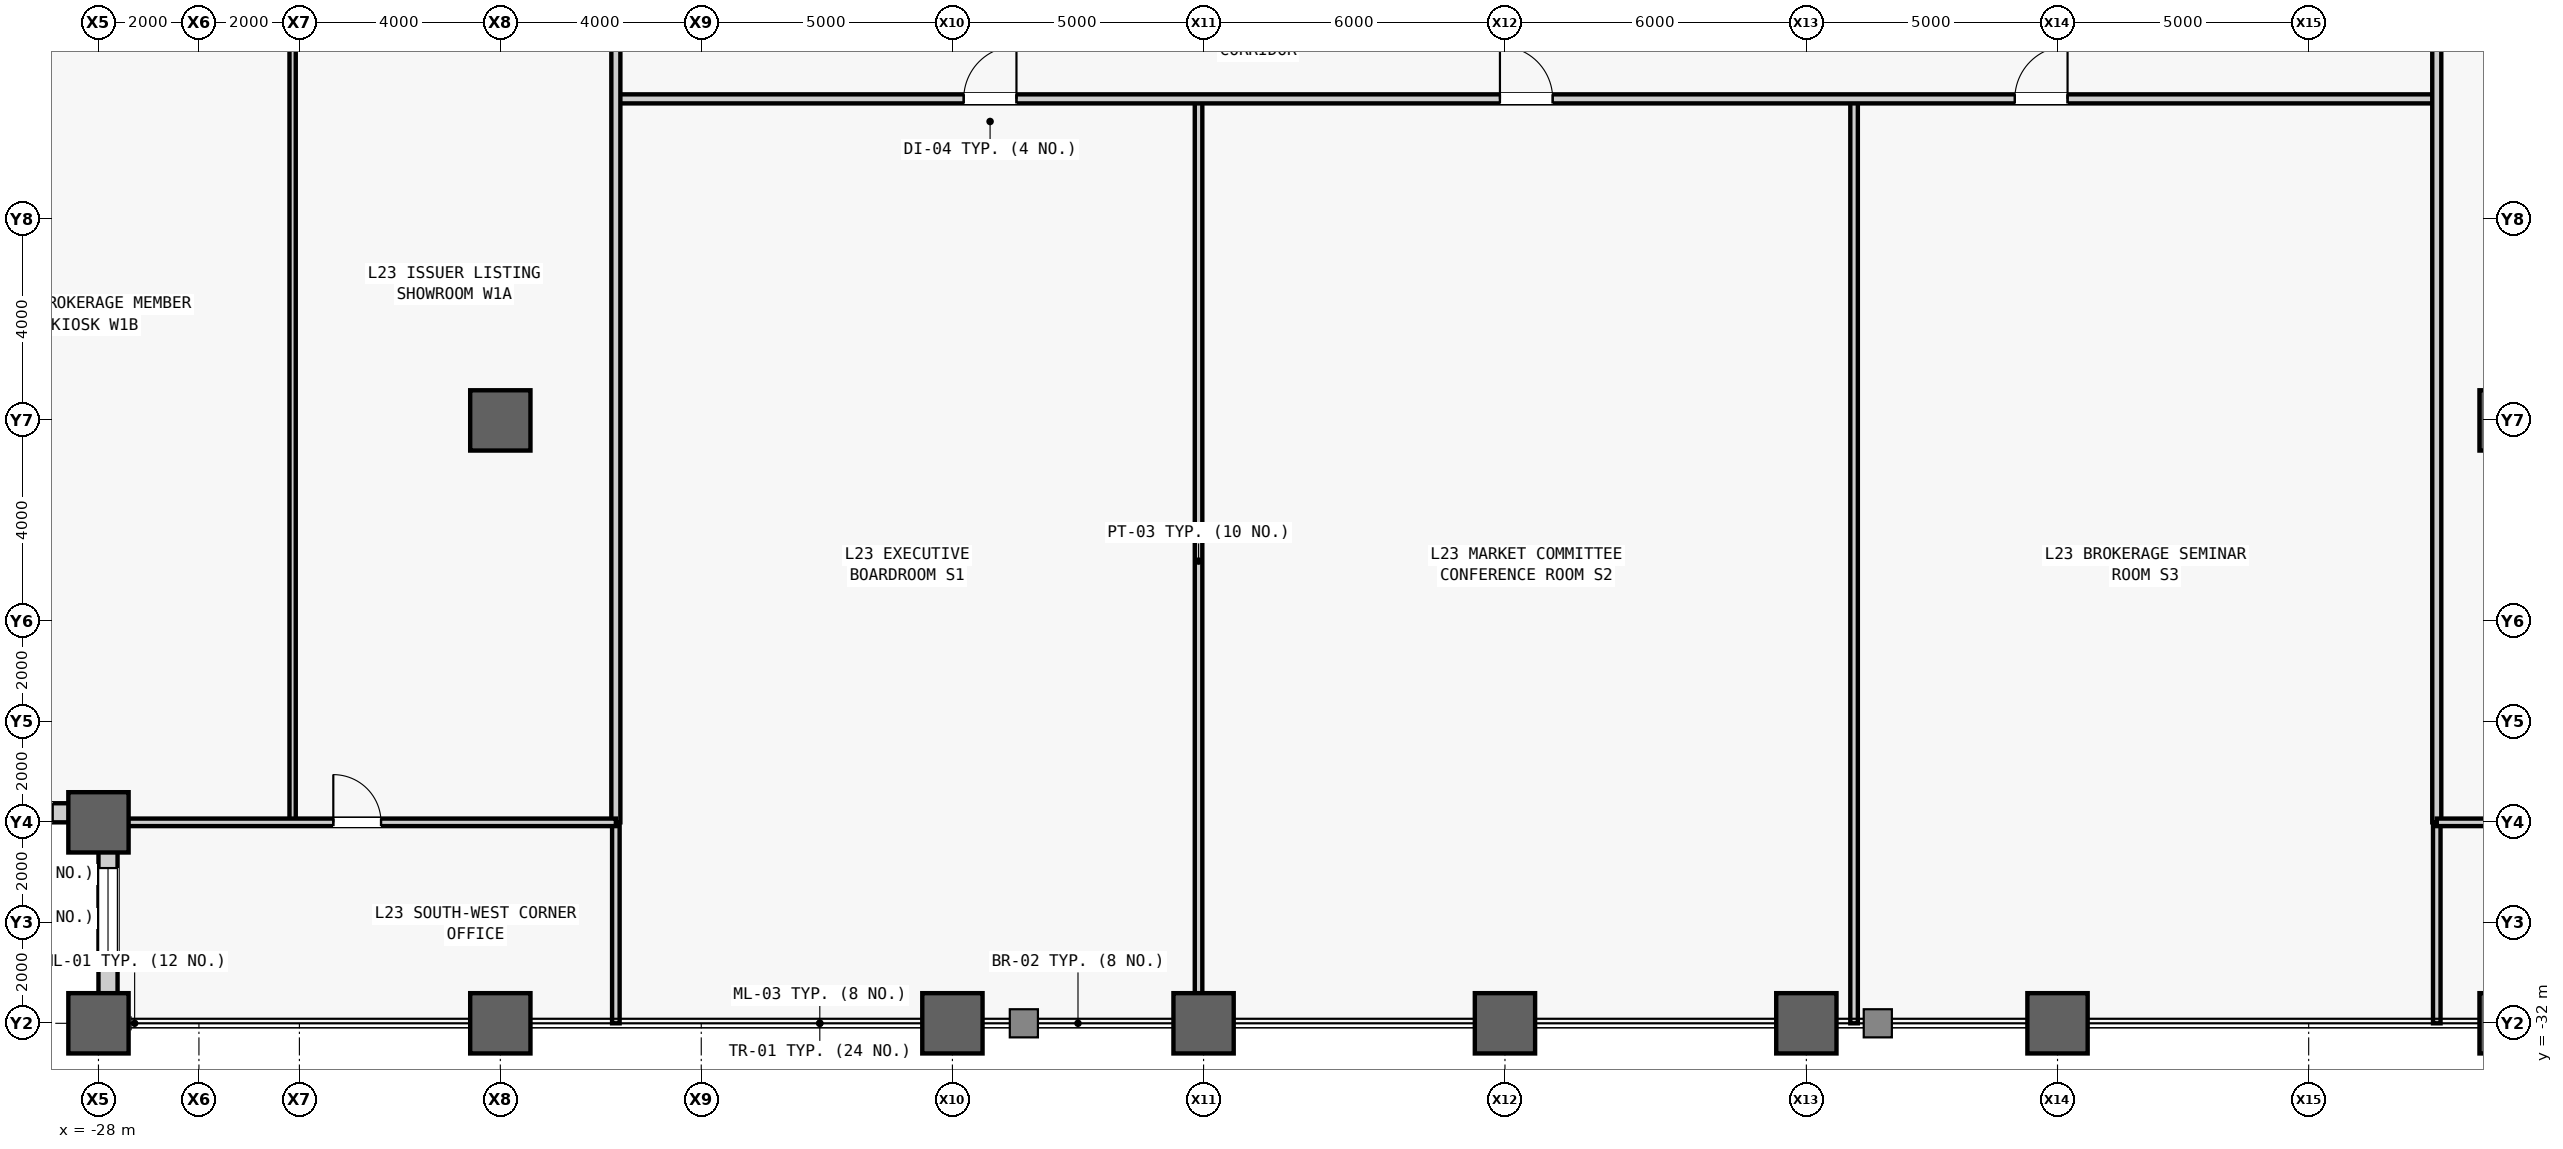
"""IFC4 building model, lengths in metres.
Left out: names, types, materials, properties, quantities, classifications, styles, units other than length and angle.
Written with IfcOpenShell. Run it as: python <this file> out.ifc"""

import sys

from ifc_helpers import new_model, si_unit, direction, frame, frame_2d, origin, origin_2d, place, context, subcontext, project, spatial, rectangle, hollow_rectangle, extrude, source, transform, mapped, element, fill, save


model = new_model("IFC4")
c1 = context("Model", 3, precision=1e-05, world=origin(), true_north=direction((0.0, 1.0)))
c2 = subcontext(c1, "Body", "Model", "MODEL_VIEW")
j1 = project(units=[si_unit("LENGTHUNIT", "METRE"), si_unit("PLANEANGLEUNIT", "RADIAN")], contexts=[c1])
p1 = place(None, origin())
s1 = spatial("IfcSite", under=j1, at=p1, CompositionType="ELEMENT")
p2 = place(p1, origin())
s2 = spatial("IfcBuilding", under=s1, at=p2, CompositionType="ELEMENT")
p3 = place(p2, frame((0.0, 0.0, 103.7)))
s3 = spatial("IfcBuildingStorey", under=s2, at=p3, CompositionType="ELEMENT", Elevation=103.7)
m1 = source(origin(), c2, "Body", "SweptSolid", [
    extrude(hollow_rectangle(XDim=1.2, YDim=1.2, WallThickness=0.07, at=origin_2d()), origin(), (0.0, 0.0, 1.0), 4.1),
])
for number, where, z_axis, x_axis in (
    (1, (-28.0, -32.0, 0.0), (0.0, 0.0, 1.0), (1.0, 0.0, 0.0)),
    (2, (-28.0, -28.0, 0.0), (0.0, 0.0, 1.0), (1.0, 0.0, 0.0)),
    (3, (-20.0, -32.0, 0.0), (0.0, 0.0, 1.0), (1.0, 0.0, 0.0)),
    (4, (-20.0, -20.0, 0.0), (0.0, 0.0, 1.0), (1.0, 0.0, 0.0)),
    (5, (-11.0, -32.0, 0.0), (0.0, 0.0, 1.0), (1.0, 0.0, 0.0)),
    (6, (-6.0, -32.0, 0.0), (0.0, 0.0, 1.0), (1.0, 0.0, 0.0)),
    (7, (0.0, -32.0, 0.0), (0.0, 0.0, 1.0), (1.0, 0.0, 0.0)),
    (8, (6.0, -32.0, 0.0), (0.0, 0.0, 1.0), (1.0, 0.0, 0.0)),
    (9, (11.0, -32.0, 0.0), (0.0, 0.0, 1.0), (1.0, 0.0, 0.0)),
    (10, (20.0, -32.0, 0.0), (0.0, 0.0, 1.0), (1.0, 0.0, 0.0)),
    (11, (20.0, -20.0, 0.0), (0.0, 0.0, 1.0), (1.0, 0.0, 0.0)),
):
    element("IfcColumn", number, at=place(p3, frame(where, z_axis=z_axis, x_axis=x_axis)), inside=s3, PredefinedType="COLUMN", context=c2, shape_type="MappedRepresentation", body=[
        mapped(m1, transform((0.0, 0.0, 0.0), scale=1.0)),
    ])
m2 = source(origin(), c2, "Body", "SweptSolid", [
    extrude(rectangle(XDim=3.62, YDim=0.38, at=frame_2d((1.81, 0.0))), origin(), (0.0, 0.0, 1.0), 3.145),
])
p4 = place(p3, frame((-28.0, -27.81, 0.0), z_axis=(0.0, 0.0, 1.0), x_axis=(-1.0, 0.0, 0.0)))
e12 = element("IfcWall", 12, at=p4, inside=s3, PredefinedType="STANDARD", context=c2, shape_type="MappedRepresentation", body=[
    mapped(m2, transform((0.0, 0.0, 0.0), scale=1.0)),
])
m3 = source(origin(), c2, "Body", "SweptSolid", [
    extrude(rectangle(XDim=1.8, YDim=2.4, at=frame_2d((0.9, 1.2))), frame((0.0, 0.2, 0.0), z_axis=(0.0, -1.0, 0.0), x_axis=(1.0, 0.0, 0.0)), (0.0, 0.0, 1.0), 0.4),
])
p5 = place(p4, frame((0.91, 0.0, 0.5)))
e13 = element("IfcOpeningElement", 13, at=p5, cuts=e12, PredefinedType="OPENING", context=c2, shape_type="MappedRepresentation", body=[
    mapped(m3, transform((0.0, 0.0, 0.0), scale=1.0)),
])
p6 = place(p3, frame((-27.81, -31.62, 0.0), z_axis=(0.0, 0.0, 1.0), x_axis=(0.0, 1.0, 0.0)))
e14 = element("IfcWall", 14, at=p6, inside=s3, PredefinedType="STANDARD", context=c2, shape_type="MappedRepresentation", body=[
    mapped(m2, transform((0.0, 0.0, 0.0), scale=1.0)),
])
p7 = place(p6, frame((0.91, 0.0, 0.5)))
e15 = element("IfcOpeningElement", 15, at=p7, cuts=e14, PredefinedType="OPENING", context=c2, shape_type="MappedRepresentation", body=[
    mapped(m3, transform((0.0, 0.0, 0.0), scale=1.0)),
])
m4 = source(origin(), c2, "Body", "SweptSolid", [
    extrude(rectangle(XDim=18.4, YDim=0.15, at=frame_2d((9.2, 0.0))), origin(), (0.0, 0.0, 1.0), 3.067),
])
p8 = place(p3, frame((-6.1, -32.0, 0.0), z_axis=(0.0, 0.0, 1.0), x_axis=(0.0, 1.0, 0.0)))
e16 = element("IfcWall", 16, at=p8, inside=s3, PredefinedType="PARTITIONING", context=c2, shape_type="MappedRepresentation", body=[
    mapped(m4, transform((0.0, 0.0, 0.0), scale=1.0)),
])
m5 = source(origin(), c2, "Body", "SweptSolid", [
    extrude(rectangle(XDim=18.4, YDim=0.15, at=frame_2d((9.2, 0.0))), origin(), (0.0, 0.0, 1.0), 3.84),
])
p9 = place(p3, frame((6.95, -32.0, 0.0), z_axis=(0.0, 0.0, 1.0), x_axis=(0.0, 1.0, 0.0)))
e17 = element("IfcWall", 17, at=p9, inside=s3, PredefinedType="PARTITIONING", context=c2, shape_type="MappedRepresentation", body=[
    mapped(m5, transform((0.0, 0.0, 0.0), scale=1.0)),
])
m6 = source(origin(), c2, "Body", "SweptSolid", [
    extrude(rectangle(XDim=36.25, YDim=0.18, at=frame_2d((18.125, 0.0))), origin(), (0.0, 0.0, 1.0), 3.84),
])
p10 = place(p3, frame((-17.7, -13.6, 0.0), z_axis=(0.0, 0.0, 1.0), x_axis=(1.0, 0.0, 0.0)))
e18 = element("IfcWall", 18, at=p10, inside=s3, PredefinedType="PARTITIONING", context=c2, shape_type="MappedRepresentation", body=[
    mapped(m6, transform((0.0, 0.0, 0.0), scale=1.0)),
])
m7 = source(origin(), c2, "Body", "SweptSolid", [
    extrude(rectangle(XDim=1.05, YDim=2.2, at=frame_2d((0.525, 1.1))), frame((0.0, 0.1, 0.0), z_axis=(0.0, -1.0, 0.0), x_axis=(1.0, 0.0, 0.0)), (0.0, 0.0, 1.0), 0.2),
])
p11 = place(p10, frame((6.925, 0.0, 0.0)))
e19 = element("IfcOpeningElement", 19, at=p11, cuts=e18, PredefinedType="OPENING", context=c2, shape_type="MappedRepresentation", body=[
    mapped(m7, transform((0.0, 0.0, 0.0), scale=1.0)),
])
p12 = place(p10, frame((17.6, 0.0, 0.0)))
e20 = element("IfcOpeningElement", 20, at=p12, cuts=e18, PredefinedType="OPENING", context=c2, shape_type="MappedRepresentation", body=[
    mapped(m7, transform((0.0, 0.0, 0.0), scale=1.0)),
])
p13 = place(p10, frame((27.85, 0.0, 0.0)))
e21 = element("IfcOpeningElement", 21, at=p13, cuts=e18, PredefinedType="OPENING", context=c2, shape_type="MappedRepresentation", body=[
    mapped(m7, transform((0.0, 0.0, 0.0), scale=1.0)),
])
m8 = source(origin(), c2, "Body", "SweptSolid", [
    extrude(rectangle(XDim=4.0, YDim=0.15, at=frame_2d((2.0, 0.0))), origin(), (0.0, 0.0, 1.0), 3.84),
])
for number, where, z_axis, x_axis in (
    (22, (-17.7, -32.0, 0.0), (0.0, 0.0, 1.0), (0.0, 1.0, 0.0)),
    (23, (18.55, -32.0, 0.0), (0.0, 0.0, 1.0), (0.0, 1.0, 0.0)),
):
    element("IfcWall", number, at=place(p3, frame(where, z_axis=z_axis, x_axis=x_axis)), inside=s3, PredefinedType="PARTITIONING", context=c2, shape_type="MappedRepresentation", body=[
        mapped(m8, transform((0.0, 0.0, 0.0), scale=1.0)),
    ])
m9 = source(origin(), c2, "Body", "SweptSolid", [
    extrude(rectangle(XDim=27.135, YDim=0.125, at=frame_2d((13.567, 0.0))), origin(), (0.0, 0.0, 1.0), 3.84),
])
p14 = place(p3, frame((-24.135, -28.0, 0.0), z_axis=(0.0, 0.0, 1.0), x_axis=(0.0, 1.0, 0.0)))
e24 = element("IfcWall", 24, at=p14, inside=s3, PredefinedType="PARTITIONING", context=c2, shape_type="MappedRepresentation", body=[
    mapped(m9, transform((0.0, 0.0, 0.0), scale=1.0)),
])
m10 = source(origin(), c2, "Body", "SweptSolid", [
    extrude(rectangle(XDim=0.95, YDim=2.15, at=frame_2d((0.475, 1.075))), frame((0.0, 0.073, 0.0), z_axis=(0.0, -1.0, 0.0), x_axis=(1.0, 0.0, 0.0)), (0.0, 0.0, 1.0), 0.145),
])
p15 = place(p14, frame((20.292, 0.0, 0.0)))
e25 = element("IfcOpeningElement", 25, at=p15, cuts=e24, PredefinedType="OPENING", context=c2, shape_type="MappedRepresentation", body=[
    mapped(m10, transform((0.0, 0.0, 0.0), scale=1.0)),
])
m11 = source(origin(), c2, "Body", "SweptSolid", [
    extrude(rectangle(XDim=56.0, YDim=0.18, at=frame_2d((28.0, 0.0))), origin(), (0.0, 0.0, 1.0), 3.84),
])
p16 = place(p3, frame((-17.7, -28.0, 0.0), z_axis=(0.0, 0.0, 1.0), x_axis=(0.0, 1.0, 0.0)))
e26 = element("IfcWall", 26, at=p16, inside=s3, PredefinedType="PARTITIONING", context=c2, shape_type="MappedRepresentation", body=[
    mapped(m11, transform((0.0, 0.0, 0.0), scale=1.0)),
])
m12 = source(origin(), c2, "Body", "SweptSolid", [
    extrude(rectangle(XDim=0.95, YDim=2.15, at=frame_2d((0.475, 1.075))), frame((0.0, 0.1, 0.0), z_axis=(0.0, -1.0, 0.0), x_axis=(1.0, 0.0, 0.0)), (0.0, 0.0, 1.0), 0.2),
])
p17 = place(p16, frame((20.593, 0.0, 0.0)))
e27 = element("IfcOpeningElement", 27, at=p17, cuts=e26, PredefinedType="OPENING", context=c2, shape_type="MappedRepresentation", body=[
    mapped(m12, transform((0.0, 0.0, 0.0), scale=1.0)),
])
p18 = place(p16, frame((34.143, 0.0, 0.0)))
e28 = element("IfcOpeningElement", 28, at=p18, cuts=e26, PredefinedType="OPENING", context=c2, shape_type="MappedRepresentation", body=[
    mapped(m12, transform((0.0, 0.0, 0.0), scale=1.0)),
])
p19 = place(p3, frame((18.55, -28.0, 0.0), z_axis=(0.0, 0.0, 1.0), x_axis=(0.0, 1.0, 0.0)))
e29 = element("IfcWall", 29, at=p19, inside=s3, PredefinedType="PARTITIONING", context=c2, shape_type="MappedRepresentation", body=[
    mapped(m11, transform((0.0, 0.0, 0.0), scale=1.0)),
])
p20 = place(p19, frame((19.036, 0.0, 0.0)))
e30 = element("IfcOpeningElement", 30, at=p20, cuts=e29, PredefinedType="OPENING", context=c2, shape_type="MappedRepresentation", body=[
    mapped(m12, transform((0.0, 0.0, 0.0), scale=1.0)),
])
p21 = place(p19, frame((28.358, 0.0, 0.0)))
e31 = element("IfcOpeningElement", 31, at=p21, cuts=e29, PredefinedType="OPENING", context=c2, shape_type="MappedRepresentation", body=[
    mapped(m12, transform((0.0, 0.0, 0.0), scale=1.0)),
])
p22 = place(p19, frame((37.397, 0.0, 0.0)))
e32 = element("IfcOpeningElement", 32, at=p22, cuts=e29, PredefinedType="OPENING", context=c2, shape_type="MappedRepresentation", body=[
    mapped(m12, transform((0.0, 0.0, 0.0), scale=1.0)),
])
m13 = source(origin(), c2, "Body", "SweptSolid", [
    extrude(rectangle(XDim=10.3, YDim=0.15, at=frame_2d((5.15, 0.0))), origin(), (0.0, 0.0, 1.0), 3.84),
])
p23 = place(p3, frame((-28.0, -28.0, 0.0), z_axis=(0.0, 0.0, 1.0), x_axis=(1.0, 0.0, 0.0)))
e33 = element("IfcWall", 33, at=p23, inside=s3, PredefinedType="PARTITIONING", context=c2, shape_type="MappedRepresentation", body=[
    mapped(m13, transform((0.0, 0.0, 0.0), scale=1.0)),
])
m14 = source(origin(), c2, "Body", "SweptSolid", [
    extrude(rectangle(XDim=0.95, YDim=2.15, at=frame_2d((0.475, 1.075))), frame((0.0, 0.085, 0.0), z_axis=(0.0, -1.0, 0.0), x_axis=(1.0, 0.0, 0.0)), (0.0, 0.0, 1.0), 0.17),
])
p24 = place(p23, frame((4.675, 0.0, 0.0)))
e34 = element("IfcOpeningElement", 34, at=p24, cuts=e33, PredefinedType="OPENING", context=c2, shape_type="MappedRepresentation", body=[
    mapped(m14, transform((0.0, 0.0, 0.0), scale=1.0)),
])
m15 = source(origin(), c2, "Body", "SweptSolid", [
    extrude(rectangle(XDim=9.45, YDim=0.15, at=frame_2d((4.725, 0.0))), origin(), (0.0, 0.0, 1.0), 3.84),
])
p25 = place(p3, frame((18.55, -28.0, 0.0), z_axis=(0.0, 0.0, 1.0), x_axis=(1.0, 0.0, 0.0)))
e35 = element("IfcWall", 35, at=p25, inside=s3, PredefinedType="PARTITIONING", context=c2, shape_type="MappedRepresentation", body=[
    mapped(m15, transform((0.0, 0.0, 0.0), scale=1.0)),
])
p26 = place(p25, frame((4.25, 0.0, 0.0)))
e36 = element("IfcOpeningElement", 36, at=p26, cuts=e35, PredefinedType="OPENING", context=c2, shape_type="MappedRepresentation", body=[
    mapped(m14, transform((0.0, 0.0, 0.0), scale=1.0)),
])
m16 = source(origin(), c2, "Body", "SweptSolid", [
    extrude(rectangle(XDim=1.8, YDim=2.4, at=frame_2d((0.9, 1.2))), frame((0.0, 0.03, 0.0), z_axis=(0.0, -1.0, 0.0), x_axis=(1.0, 0.0, 0.0)), (0.0, 0.0, 1.0), 0.06),
])
p27 = place(p5, origin())
e37 = element("IfcWindow", 37, at=p27, inside=s3, PartitioningType="SINGLE_PANEL", PredefinedType="WINDOW", context=c2, shape_type="MappedRepresentation", body=[
    mapped(m16, transform((0.0, 0.0, 0.0), scale=1.0)),
])
fill(e13, e37)
p28 = place(p7, origin())
e38 = element("IfcWindow", 38, at=p28, inside=s3, PartitioningType="SINGLE_PANEL", PredefinedType="WINDOW", context=c2, shape_type="MappedRepresentation", body=[
    mapped(m16, transform((0.0, 0.0, 0.0), scale=1.0)),
])
fill(e15, e38)
m17 = source(origin(), c2, "Body", "SweptSolid", [
    extrude(rectangle(XDim=1.05, YDim=2.2, at=frame_2d((0.525, 1.1))), frame((0.0, 0.025, 0.0), z_axis=(0.0, -1.0, 0.0), x_axis=(1.0, 0.0, 0.0)), (0.0, 0.0, 1.0), 0.05),
])
p29 = place(p11, origin())
e39 = element("IfcDoor", 39, at=p29, inside=s3, OperationType="SINGLE_SWING_RIGHT", PredefinedType="DOOR", context=c2, shape_type="MappedRepresentation", body=[
    mapped(m17, transform((0.0, 0.0, 0.0), scale=1.0)),
])
fill(e19, e39)
p30 = place(p12, origin())
e40 = element("IfcDoor", 40, at=p30, inside=s3, OperationType="SINGLE_SWING_LEFT", PredefinedType="DOOR", context=c2, shape_type="MappedRepresentation", body=[
    mapped(m17, transform((0.0, 0.0, 0.0), scale=1.0)),
])
fill(e20, e40)
p31 = place(p13, origin())
e41 = element("IfcDoor", 41, at=p31, inside=s3, OperationType="SINGLE_SWING_RIGHT", PredefinedType="DOOR", context=c2, shape_type="MappedRepresentation", body=[
    mapped(m17, transform((0.0, 0.0, 0.0), scale=1.0)),
])
fill(e21, e41)
m18 = source(origin(), c2, "Body", "SweptSolid", [
    extrude(rectangle(XDim=0.95, YDim=2.15, at=frame_2d((0.475, 1.075))), frame((0.0, 0.025, 0.0), z_axis=(0.0, -1.0, 0.0), x_axis=(1.0, 0.0, 0.0)), (0.0, 0.0, 1.0), 0.05),
])
p32 = place(p24, origin())
e42 = element("IfcDoor", 42, at=p32, inside=s3, OperationType="SINGLE_SWING_LEFT", PredefinedType="DOOR", context=c2, shape_type="MappedRepresentation", body=[
    mapped(m18, transform((0.0, 0.0, 0.0), scale=1.0)),
])
fill(e34, e42)
save(model, sys.argv[1])
